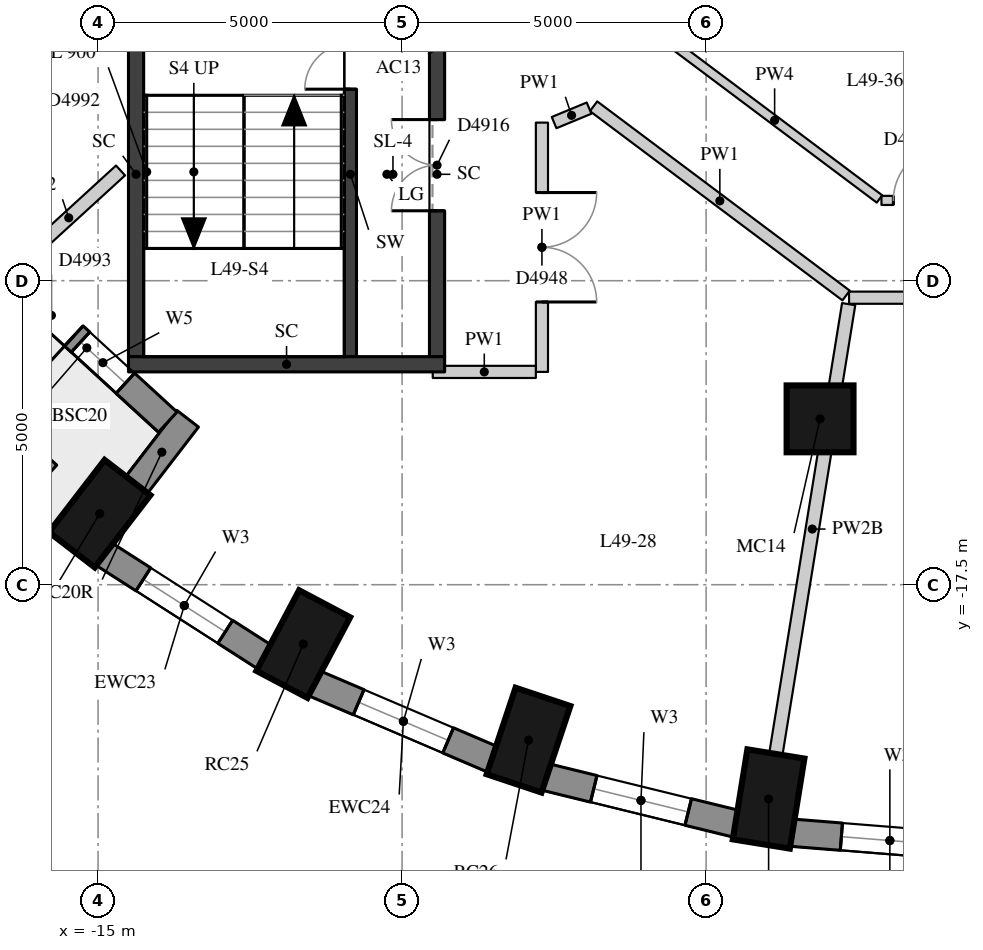
"""IFC4 building model, lengths in metres.
Left out: names, types, materials, properties, quantities, classifications, styles, units other than length and angle.
Written with IfcOpenShell. Run it as: python <this file> out.ifc"""

import sys

from ifc_helpers import new_model, si_unit, direction, frame, frame_2d, origin, origin_2d, place, context, subcontext, project, spatial, rectangle, extrude, element, fill, save


model = new_model("IFC4")
c1 = context("Model", 3, precision=1e-05, world=origin(), true_north=direction((0.0, 1.0)))
c2 = subcontext(c1, "Body", "Model", "MODEL_VIEW")
j1 = project(units=[si_unit("LENGTHUNIT", "METRE"), si_unit("PLANEANGLEUNIT", "RADIAN")], contexts=[c1])
p1 = place(None, origin())
s1 = spatial("IfcSite", under=j1, at=p1, CompositionType="ELEMENT")
p2 = place(p1, origin())
s2 = spatial("IfcBuilding", under=s1, at=p2, CompositionType="ELEMENT")
p3 = place(p2, frame((0.0, 0.0, 174.8)))
s3 = spatial("IfcBuildingStorey", under=s2, at=p3, CompositionType="ELEMENT", Elevation=174.8)
for number, where, z_axis, x_axis in (
    (1, (-14.973, -16.332, 0.0), (0.0, 0.0, 1.0), (-0.61, -0.792, 0.0)),
    (2, (-11.625, -18.476, 0.0), (0.0, 0.0, 1.0), (-0.468, -0.884, 0.0)),
    (3, (-7.92, -20.056, 0.0), (0.0, 0.0, 1.0), (-0.317, -0.949, 0.0)),
    (4, (-3.972, -21.024, 0.0), (0.0, 0.0, 1.0), (-0.16, -0.987, 0.0)),
):
    element("IfcColumn", number, at=place(p3, frame(where, z_axis=z_axis, x_axis=x_axis)), inside=s3, PredefinedType="COLUMN", context=c2, shape_type="SweptSolid", body=[
        extrude(rectangle(XDim=1.5, YDim=0.95, at=origin_2d()), origin(), (0.0, 0.0, 1.0), 3.3),
    ])
p4 = place(p3, frame((-3.126, -14.772, 0.0), z_axis=(0.0, 0.0, 1.0), x_axis=(1.0, 0.0, 0.0)))
e5 = element("IfcColumn", 5, at=p4, inside=s3, PredefinedType="COLUMN", context=c2, shape_type="SweptSolid", body=[
    extrude(rectangle(XDim=1.1, YDim=1.1, at=origin_2d()), origin(), (0.0, 0.0, 1.0), 3.3),
])
p5 = place(p3, frame((-14.908, -16.993, 0.0), z_axis=(0.0, 0.0, 1.0), x_axis=(0.842065914439, -0.539374633943, 0.0)))
e6 = element("IfcWall", 6, at=p5, inside=s3, PredefinedType="SOLIDWALL", context=c2, shape_type="SweptSolid", body=[
    extrude(rectangle(XDim=3.151, YDim=0.45, at=frame_2d((1.576, 0.0))), origin(), (0.0, 0.0, 1.0), 3.02),
])
p6 = place(p5, frame((0.776, 0.0, 0.4)))
e7 = element("IfcOpeningElement", 7, at=p6, cuts=e6, PredefinedType="OPENING", context=c2, shape_type="SweptSolid", body=[
    extrude(rectangle(XDim=1.6, YDim=1.75, at=frame_2d((0.8, 0.875))), frame((0.0, 0.235, 0.0), z_axis=(0.0, -1.0, 0.0), x_axis=(1.0, 0.0, 0.0)), (0.0, 0.0, 1.0), 0.47),
])
p7 = place(p3, frame((-11.45, -19.119, 0.0), z_axis=(0.0, 0.0, 1.0), x_axis=(0.919798725687, -0.392390499663, 0.0)))
e8 = element("IfcWall", 8, at=p7, inside=s3, PredefinedType="SOLIDWALL", context=c2, shape_type="SweptSolid", body=[
    extrude(rectangle(XDim=3.2, YDim=0.45, at=frame_2d((1.6, 0.0))), origin(), (0.0, 0.0, 1.0), 3.02),
])
p8 = place(p7, frame((0.8, 0.0, 0.4)))
e9 = element("IfcOpeningElement", 9, at=p8, cuts=e8, PredefinedType="OPENING", context=c2, shape_type="SweptSolid", body=[
    extrude(rectangle(XDim=1.6, YDim=1.75, at=frame_2d((0.8, 0.875))), frame((0.0, 0.235, 0.0), z_axis=(0.0, -1.0, 0.0), x_axis=(1.0, 0.0, 0.0)), (0.0, 0.0, 1.0), 0.47),
])
p9 = place(p3, frame((-7.643, -20.662, 0.0), z_axis=(0.0, 0.0, 1.0), x_axis=(0.971232901476, -0.238131583563, 0.0)))
e10 = element("IfcWall", 10, at=p9, inside=s3, PredefinedType="SOLIDWALL", context=c2, shape_type="SweptSolid", body=[
    extrude(rectangle(XDim=3.237, YDim=0.45, at=frame_2d((1.618, 0.0))), origin(), (0.0, 0.0, 1.0), 3.02),
])
p10 = place(p9, frame((0.818, 0.0, 0.4)))
e11 = element("IfcOpeningElement", 11, at=p10, cuts=e10, PredefinedType="OPENING", context=c2, shape_type="SweptSolid", body=[
    extrude(rectangle(XDim=1.6, YDim=1.75, at=frame_2d((0.8, 0.875))), frame((0.0, 0.235, 0.0), z_axis=(0.0, -1.0, 0.0), x_axis=(1.0, 0.0, 0.0)), (0.0, 0.0, 1.0), 0.47),
])
p11 = place(p3, frame((-3.601, -21.578, 0.0), z_axis=(0.0, 0.0, 1.0), x_axis=(0.996812416891, -0.079780984773, 0.0)))
e12 = element("IfcWall", 12, at=p11, inside=s3, PredefinedType="SOLIDWALL", context=c2, shape_type="SweptSolid", body=[
    extrude(rectangle(XDim=3.256, YDim=0.45, at=frame_2d((1.628, 0.0))), origin(), (0.0, 0.0, 1.0), 3.02),
])
p12 = place(p11, frame((0.828, 0.0, 0.4)))
e13 = element("IfcOpeningElement", 13, at=p12, cuts=e12, PredefinedType="OPENING", context=c2, shape_type="SweptSolid", body=[
    extrude(rectangle(XDim=1.6, YDim=1.75, at=frame_2d((0.8, 0.875))), frame((0.0, 0.235, 0.0), z_axis=(0.0, -1.0, 0.0), x_axis=(1.0, 0.0, 0.0)), (0.0, 0.0, 1.0), 0.47),
])
p13 = place(p3, frame((-14.375, -15.871, 0.0), z_axis=(0.0, 0.0, 1.0), x_axis=(0.609982261713, 0.792415068253, 0.0)))
e14 = element("IfcWall", 14, at=p13, inside=s3, PredefinedType="SOLIDWALL", context=c2, shape_type="SweptSolid", body=[
    extrude(rectangle(XDim=1.39, YDim=0.45, at=frame_2d((0.695, 0.0))), origin(), (0.0, 0.0, 1.0), 2.57),
])
p14 = place(p3, frame((-16.515, -12.384, 0.0), z_axis=(0.0, 0.0, 1.0), x_axis=(0.736968915604, -0.675926636133, 0.0)))
e15 = element("IfcWall", 15, at=p14, inside=s3, PredefinedType="SOLIDWALL", context=c2, shape_type="SweptSolid", body=[
    extrude(rectangle(XDim=3.612, YDim=0.45, at=frame_2d((1.806, 0.0))), origin(), (0.0, 0.0, 1.0), 3.02),
])
p15 = place(p14, frame((1.665, 0.0, 0.4)))
e16 = element("IfcOpeningElement", 16, at=p15, cuts=e15, PredefinedType="OPENING", context=c2, shape_type="SweptSolid", body=[
    extrude(rectangle(XDim=1.0, YDim=1.75, at=frame_2d((0.5, 0.875))), frame((0.0, 0.235, 0.0), z_axis=(0.0, -1.0, 0.0), x_axis=(1.0, 0.0, 0.0)), (0.0, 0.0, 1.0), 0.47),
])
p16 = place(p14, frame((0.515, 0.0, 0.0)))
e17 = element("IfcOpeningElement", 17, at=p16, cuts=e15, PredefinedType="OPENING", context=c2, shape_type="SweptSolid", body=[
    extrude(rectangle(XDim=1.0, YDim=2.15, at=frame_2d((0.5, 1.075))), frame((0.0, 0.235, 0.0), z_axis=(0.0, -1.0, 0.0), x_axis=(1.0, 0.0, 0.0)), (0.0, 0.0, 1.0), 0.47),
])
p17 = place(p3, frame((-17.244, -14.576, 0.0), z_axis=(0.0, 0.0, 1.0), x_axis=(0.737874397391, -0.674938051731, 0.0)))
e18 = element("IfcWall", 18, at=p17, inside=s3, PredefinedType="USERDEFINED", context=c2, shape_type="SweptSolid", body=[
    extrude(rectangle(XDim=1.8, YDim=0.7, at=frame_2d((0.9, 0.0))), origin(), (0.0, 0.0, 1.0), 0.75),
])
p18 = place(p3, frame((-10.85, -13.75, 0.0), z_axis=(0.0, 0.0, 1.0), x_axis=(0.0, 1.0, 0.0)))
e19 = element("IfcWall", 19, at=p18, inside=s3, PredefinedType="SHEAR", context=c2, shape_type="SweptSolid", body=[
    extrude(rectangle(XDim=6.0, YDim=0.2, at=frame_2d((3.0, 0.0))), origin(), (0.0, 0.0, 1.0), 3.02),
])
p19 = place(p18, frame((4.4, 0.0, 0.0)))
e20 = element("IfcOpeningElement", 20, at=p19, cuts=e19, PredefinedType="OPENING", context=c2, shape_type="SweptSolid", body=[
    extrude(rectangle(XDim=1.5, YDim=2.1, at=frame_2d((0.75, 1.05))), frame((0.0, 0.11, 0.0), z_axis=(0.0, -1.0, 0.0), x_axis=(1.0, 0.0, 0.0)), (0.0, 0.0, 1.0), 0.22),
])
p20 = place(p3, frame((-14.375, -13.75, -0.28), z_axis=(0.0, 0.0, 1.0), x_axis=(0.0, 1.0, 0.0)))
e21 = element("IfcWall", 21, at=p20, inside=s3, PredefinedType="SHEAR", context=c2, shape_type="SweptSolid", body=[
    extrude(rectangle(XDim=6.0, YDim=0.25, at=frame_2d((3.0, 0.0))), origin(), (0.0, 0.0, 1.0), 3.3),
])
p21 = place(p3, frame((-9.425, -13.75, -0.28), z_axis=(0.0, 0.0, 1.0), x_axis=(0.0, 1.0, 0.0)))
e22 = element("IfcWall", 22, at=p21, inside=s3, PredefinedType="SHEAR", context=c2, shape_type="SweptSolid", body=[
    extrude(rectangle(XDim=6.0, YDim=0.25, at=frame_2d((3.0, 0.0))), origin(), (0.0, 0.0, 1.0), 3.3),
])
p22 = place(p21, frame((2.4, 0.0, 0.28)))
e23 = element("IfcOpeningElement", 23, at=p22, cuts=e22, PredefinedType="OPENING", context=c2, shape_type="SweptSolid", body=[
    extrude(rectangle(XDim=1.5, YDim=2.1, at=frame_2d((0.75, 1.05))), frame((0.0, 0.135, 0.0), z_axis=(0.0, -1.0, 0.0), x_axis=(1.0, 0.0, 0.0)), (0.0, 0.0, 1.0), 0.27),
])
p23 = place(p3, frame((-14.5, -13.875, -0.28), z_axis=(0.0, 0.0, 1.0), x_axis=(1.0, 0.0, 0.0)))
e24 = element("IfcWall", 24, at=p23, inside=s3, PredefinedType="SHEAR", context=c2, shape_type="SweptSolid", body=[
    extrude(rectangle(XDim=5.2, YDim=0.25, at=frame_2d((2.6, 0.0))), origin(), (0.0, 0.0, 1.0), 3.3),
])
p24 = place(p3, frame((-7.7, -9.9, 0.0), z_axis=(0.0, 0.0, 1.0), x_axis=(0.0, -1.0, 0.0)))
e25 = element("IfcWall", 25, at=p24, inside=s3, PredefinedType="PARTITIONING", context=c2, shape_type="SweptSolid", body=[
    extrude(rectangle(XDim=4.1, YDim=0.2, at=frame_2d((2.05, 0.0))), origin(), (0.0, 0.0, 1.0), 3.02),
])
p25 = place(p24, frame((1.15, 0.0, 0.0)))
e26 = element("IfcOpeningElement", 26, at=p25, cuts=e25, PredefinedType="OPENING", context=c2, shape_type="SweptSolid", body=[
    extrude(rectangle(XDim=1.8, YDim=2.1, at=frame_2d((0.9, 1.05))), frame((0.0, 0.11, 0.0), z_axis=(0.0, -1.0, 0.0), x_axis=(1.0, 0.0, 0.0)), (0.0, 0.0, 1.0), 0.22),
])
p26 = place(p3, frame((-7.8, -14.0, 0.0), z_axis=(0.0, 0.0, 1.0), x_axis=(-1.0, 0.0, 0.0)))
e27 = element("IfcWall", 27, at=p26, inside=s3, PredefinedType="PARTITIONING", context=c2, shape_type="SweptSolid", body=[
    extrude(rectangle(XDim=1.696, YDim=0.2, at=frame_2d((0.848, 0.0))), origin(), (0.0, 0.0, 1.0), 3.02),
])
p27 = place(p3, frame((2.809, -12.78, 0.0), z_axis=(0.0, 0.0, 1.0), x_axis=(-1.0, 0.0, 0.0)))
e28 = element("IfcWall", 28, at=p27, inside=s3, PredefinedType="PARTITIONING", context=c2, shape_type="SweptSolid", body=[
    extrude(rectangle(XDim=5.458, YDim=0.2, at=frame_2d((2.729, 0.0))), origin(), (0.0, 0.0, 1.0), 3.02),
])
p28 = place(p27, frame((2.179, 0.0, 0.0)))
e29 = element("IfcOpeningElement", 29, at=p28, cuts=e28, PredefinedType="OPENING", context=c2, shape_type="SweptSolid", body=[
    extrude(rectangle(XDim=1.1, YDim=2.1, at=frame_2d((0.55, 1.05))), frame((0.0, 0.11, 0.0), z_axis=(0.0, -1.0, 0.0), x_axis=(1.0, 0.0, 0.0)), (0.0, 0.0, 1.0), 0.22),
])
p29 = place(p3, frame((-2.698, -12.744, 0.0), z_axis=(0.0, 0.0, 1.0), x_axis=(-0.800208812098, 0.59972148289, 0.0)))
e30 = element("IfcWall", 30, at=p29, inside=s3, PredefinedType="PARTITIONING", context=c2, shape_type="SweptSolid", body=[
    extrude(rectangle(XDim=5.19, YDim=0.2, at=frame_2d((2.595, 0.0))), origin(), (0.0, 0.0, 1.0), 3.02),
])
p30 = place(p3, frame((-6.925, -9.661, 0.0), z_axis=(0.0, 0.0, 1.0), x_axis=(-0.923725195793, -0.383055821855, 0.0)))
e31 = element("IfcWall", 31, at=p30, inside=s3, PredefinedType="PARTITIONING", context=c2, shape_type="SweptSolid", body=[
    extrude(rectangle(XDim=0.623, YDim=0.2, at=frame_2d((0.312, 0.0))), origin(), (0.0, 0.0, 1.0), 3.02),
])
p31 = place(p3, frame((-0.88, -11.179, 0.0), z_axis=(0.0, 0.0, 1.0), x_axis=(-1.0, 0.0, 0.0)))
e32 = element("IfcWall", 32, at=p31, inside=s3, PredefinedType="PARTITIONING", context=c2, shape_type="SweptSolid", body=[
    extrude(rectangle(XDim=1.236, YDim=0.15, at=frame_2d((0.618, 0.0))), origin(), (0.0, 0.0, 1.0), 3.02),
])
p32 = place(p31, frame((0.14, 0.0, 0.0)))
e33 = element("IfcOpeningElement", 33, at=p32, cuts=e32, PredefinedType="OPENING", context=c2, shape_type="SweptSolid", body=[
    extrude(rectangle(XDim=0.9, YDim=2.1, at=frame_2d((0.45, 1.05))), frame((0.0, 0.085, 0.0), z_axis=(0.0, -1.0, 0.0), x_axis=(1.0, 0.0, 0.0)), (0.0, 0.0, 1.0), 0.17),
])
p33 = place(p3, frame((-2.148, -11.156, 0.0), z_axis=(0.0, 0.0, 1.0), x_axis=(-0.800210636755, 0.599719048241, 0.0)))
e34 = element("IfcWall", 34, at=p33, inside=s3, PredefinedType="PARTITIONING", context=c2, shape_type="SweptSolid", body=[
    extrude(rectangle(XDim=4.311, YDim=0.15, at=frame_2d((2.155, 0.0))), origin(), (0.0, 0.0, 1.0), 3.02),
])
p34 = place(p3, frame((-16.334, -12.245, 0.0), z_axis=(0.0, 0.0, 1.0), x_axis=(0.737917457379, 0.674890973487, 0.0)))
e35 = element("IfcWall", 35, at=p34, inside=s3, PredefinedType="PARTITIONING", context=c2, shape_type="SweptSolid", body=[
    extrude(rectangle(XDim=2.309, YDim=0.22, at=frame_2d((1.154, 0.0))), origin(), (0.0, 0.0, 1.0), 3.02),
])
p35 = place(p3, frame((-3.852, -20.284, 0.0), z_axis=(0.0, 0.0, 1.0), x_axis=(0.159690244465, 0.987167172176, 0.0)))
e36 = element("IfcWall", 36, at=p35, inside=s3, PredefinedType="PARTITIONING", context=c2, shape_type="SweptSolid", body=[
    extrude(rectangle(XDim=7.494, YDim=0.22, at=frame_2d((3.747, 0.0))), origin(), (0.0, 0.0, 1.0), 2.57),
])
p36 = place(p6, origin())
e37 = element("IfcWindow", 37, at=p36, inside=s3, PartitioningType="SINGLE_PANEL", PredefinedType="WINDOW", context=c2, shape_type="SweptSolid", body=[
    extrude(rectangle(XDim=1.6, YDim=1.75, at=frame_2d((0.8, 0.875))), frame((0.0, 0.035, 0.0), z_axis=(0.0, -1.0, 0.0), x_axis=(1.0, 0.0, 0.0)), (0.0, 0.0, 1.0), 0.06),
])
fill(e7, e37)
p37 = place(p8, origin())
e38 = element("IfcWindow", 38, at=p37, inside=s3, PartitioningType="SINGLE_PANEL", PredefinedType="WINDOW", context=c2, shape_type="SweptSolid", body=[
    extrude(rectangle(XDim=1.6, YDim=1.75, at=frame_2d((0.8, 0.875))), frame((0.0, 0.035, 0.0), z_axis=(0.0, -1.0, 0.0), x_axis=(1.0, 0.0, 0.0)), (0.0, 0.0, 1.0), 0.06),
])
fill(e9, e38)
p38 = place(p10, origin())
e39 = element("IfcWindow", 39, at=p38, inside=s3, PartitioningType="SINGLE_PANEL", PredefinedType="WINDOW", context=c2, shape_type="SweptSolid", body=[
    extrude(rectangle(XDim=1.6, YDim=1.75, at=frame_2d((0.8, 0.875))), frame((0.0, 0.035, 0.0), z_axis=(0.0, -1.0, 0.0), x_axis=(1.0, 0.0, 0.0)), (0.0, 0.0, 1.0), 0.06),
])
fill(e11, e39)
p39 = place(p12, origin())
e40 = element("IfcWindow", 40, at=p39, inside=s3, PartitioningType="SINGLE_PANEL", PredefinedType="WINDOW", context=c2, shape_type="SweptSolid", body=[
    extrude(rectangle(XDim=1.6, YDim=1.75, at=frame_2d((0.8, 0.875))), frame((0.0, 0.035, 0.0), z_axis=(0.0, -1.0, 0.0), x_axis=(1.0, 0.0, 0.0)), (0.0, 0.0, 1.0), 0.06),
])
fill(e13, e40)
p40 = place(p15, origin())
e41 = element("IfcWindow", 41, at=p40, inside=s3, PartitioningType="SINGLE_PANEL", PredefinedType="WINDOW", context=c2, shape_type="SweptSolid", body=[
    extrude(rectangle(XDim=1.0, YDim=1.75, at=frame_2d((0.5, 0.875))), frame((0.0, 0.035, 0.0), z_axis=(0.0, -1.0, 0.0), x_axis=(1.0, 0.0, 0.0)), (0.0, 0.0, 1.0), 0.06),
])
fill(e16, e41)
p41 = place(p16, origin())
e42 = element("IfcDoor", 42, at=p41, inside=s3, OperationType="SINGLE_SWING_LEFT", PredefinedType="DOOR", context=c2, shape_type="SweptSolid", body=[
    extrude(rectangle(XDim=1.0, YDim=2.15, at=frame_2d((0.5, 1.075))), frame((0.0, -0.025, 0.0), z_axis=(0.0, -1.0, 0.0), x_axis=(1.0, 0.0, 0.0)), (0.0, 0.0, 1.0), 0.05),
])
fill(e17, e42)
p42 = place(p19, origin())
e43 = element("IfcDoor", 43, at=p42, inside=s3, OperationType="DOUBLE_DOOR_SINGLE_SWING", PredefinedType="DOOR", context=c2, shape_type="SweptSolid", body=[
    extrude(rectangle(XDim=1.5, YDim=2.1, at=frame_2d((0.75, 1.05))), frame((0.0, 0.025, 0.0), z_axis=(0.0, -1.0, 0.0), x_axis=(1.0, 0.0, 0.0)), (0.0, 0.0, 1.0), 0.05),
])
fill(e20, e43)
p43 = place(p22, origin())
e44 = element("IfcDoor", 44, at=p43, inside=s3, OperationType="DOUBLE_DOOR_SINGLE_SWING", PredefinedType="DOOR", context=c2, shape_type="SweptSolid", body=[
    extrude(rectangle(XDim=1.5, YDim=2.1, at=frame_2d((0.75, 1.05))), frame((0.0, 0.025, 0.0), z_axis=(0.0, -1.0, 0.0), x_axis=(1.0, 0.0, 0.0)), (0.0, 0.0, 1.0), 0.05),
])
fill(e23, e44)
p44 = place(p25, origin())
e45 = element("IfcDoor", 45, at=p44, inside=s3, OperationType="DOUBLE_DOOR_SINGLE_SWING", PredefinedType="DOOR", context=c2, shape_type="SweptSolid", body=[
    extrude(rectangle(XDim=1.8, YDim=2.1, at=frame_2d((0.9, 1.05))), frame((0.0, 0.025, 0.0), z_axis=(0.0, -1.0, 0.0), x_axis=(1.0, 0.0, 0.0)), (0.0, 0.0, 1.0), 0.05),
])
fill(e26, e45)
p45 = place(p32, origin())
e46 = element("IfcDoor", 46, at=p45, inside=s3, OperationType="SINGLE_SWING_RIGHT", PredefinedType="DOOR", context=c2, shape_type="SweptSolid", body=[
    extrude(rectangle(XDim=0.9, YDim=2.1, at=frame_2d((0.45, 1.05))), frame((0.0, 0.025, 0.0), z_axis=(0.0, -1.0, 0.0), x_axis=(1.0, 0.0, 0.0)), (0.0, 0.0, 1.0), 0.05),
])
fill(e33, e46)
save(model, sys.argv[1])
